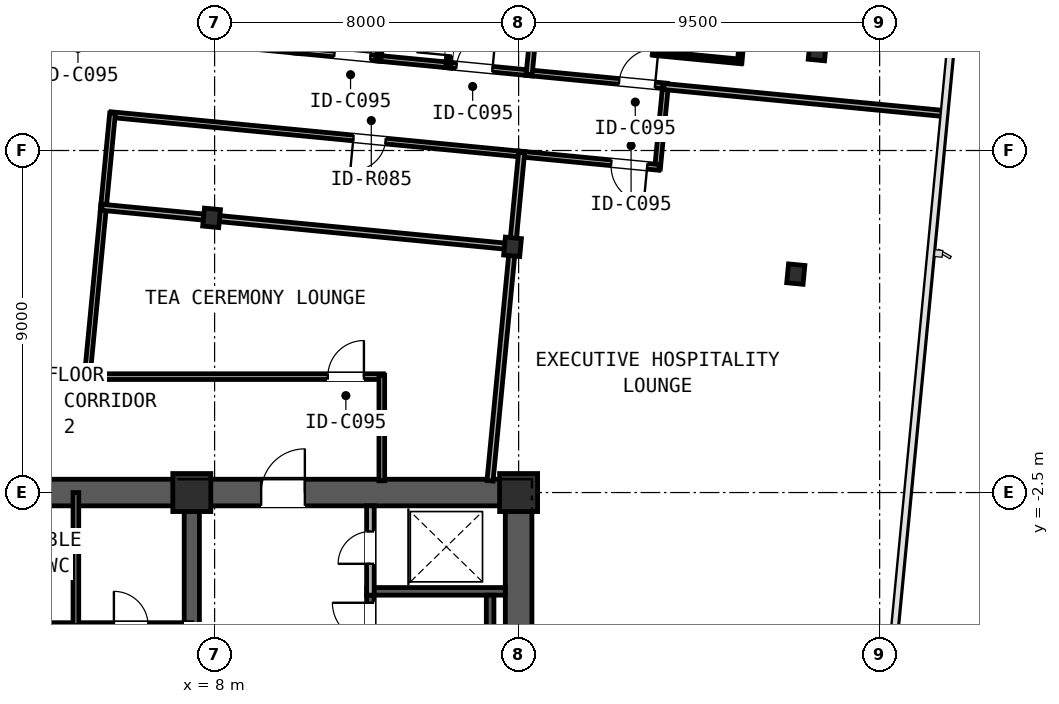
"""IFC4 building model, lengths in metres.
Left out: names, types, materials, properties, quantities, classifications, styles, units other than length and angle.
Written with IfcOpenShell. Run it as: python <this file> out.ifc"""

import sys

from ifc_helpers import new_model, si_unit, direction, frame, frame_2d, origin, origin_2d, place, context, subcontext, project, spatial, rectangle, i_section, extrude, element, fill, save


model = new_model("IFC4")
c1 = context("Model", 3, precision=1e-05, world=origin(), true_north=direction((0.0, 1.0)))
c2 = subcontext(c1, "Body", "Model", "MODEL_VIEW")
j1 = project(units=[si_unit("LENGTHUNIT", "METRE"), si_unit("PLANEANGLEUNIT", "RADIAN")], contexts=[c1])
p1 = place(None, origin())
s1 = spatial("IfcSite", under=j1, at=p1, CompositionType="ELEMENT")
p2 = place(p1, origin())
s2 = spatial("IfcBuilding", under=s1, at=p2, CompositionType="ELEMENT")
p3 = place(p2, frame((0.0, 0.0, 139.35)))
s3 = spatial("IfcBuildingStorey", under=s2, at=p3, CompositionType="ELEMENT", Elevation=139.35)
p4 = place(p3, frame((-16.35, -2.5, 0.0), z_axis=(0.0, 0.0, 1.0), x_axis=(1.0, 0.0, 0.0)))
e1 = element("IfcWall", 1, at=p4, inside=s3, PredefinedType="SHEAR", context=c2, shape_type="SweptSolid", body=[
    extrude(rectangle(XDim=32.7, YDim=0.7, at=frame_2d((16.35, 0.0))), origin(), (0.0, 0.0, 1.0), 2.91),
])
p5 = place(p4, frame((5.975, 0.0, 0.0)))
e2 = element("IfcOpeningElement", 2, at=p5, cuts=e1, PredefinedType="OPENING", context=c2, shape_type="SweptSolid", body=[
    extrude(rectangle(XDim=1.15, YDim=2.0, at=frame_2d((0.575, 1.0))), frame((0.0, 0.36, 0.0), z_axis=(0.0, -1.0, 0.0), x_axis=(1.0, 0.0, 0.0)), (0.0, 0.0, 1.0), 0.72),
])
p6 = place(p4, frame((15.55, 0.0, 0.0)))
e3 = element("IfcOpeningElement", 3, at=p6, cuts=e1, PredefinedType="OPENING", context=c2, shape_type="SweptSolid", body=[
    extrude(rectangle(XDim=1.6, YDim=2.0, at=frame_2d((0.8, 1.0))), frame((0.0, 0.36, 0.0), z_axis=(0.0, -1.0, 0.0), x_axis=(1.0, 0.0, 0.0)), (0.0, 0.0, 1.0), 0.72),
])
p7 = place(p4, frame((25.575, 0.0, 0.0)))
e4 = element("IfcOpeningElement", 4, at=p7, cuts=e1, PredefinedType="OPENING", context=c2, shape_type="SweptSolid", body=[
    extrude(rectangle(XDim=1.15, YDim=2.0, at=frame_2d((0.575, 1.0))), frame((0.0, 0.36, 0.0), z_axis=(0.0, -1.0, 0.0), x_axis=(1.0, 0.0, 0.0)), (0.0, 0.0, 1.0), 0.72),
])
p8 = place(p3, frame((16.0, -12.65, 0.0), z_axis=(0.0, 0.0, 1.0), x_axis=(0.0, 1.0, 0.0)))
e5 = element("IfcWall", 5, at=p8, inside=s3, PredefinedType="SHEAR", context=c2, shape_type="SweptSolid", body=[
    extrude(rectangle(XDim=9.8, YDim=0.7, at=frame_2d((4.9, 0.0))), origin(), (0.0, 0.0, 1.0), 2.91),
])
p9 = place(p3, frame((7.4, -12.65, 0.0), z_axis=(0.0, 0.0, 1.0), x_axis=(0.0, 1.0, 0.0)))
e6 = element("IfcWall", 6, at=p9, inside=s3, PredefinedType="SHEAR", context=c2, shape_type="SweptSolid", body=[
    extrude(rectangle(XDim=9.8, YDim=0.4, at=frame_2d((4.9, 0.0))), origin(), (0.0, 0.0, 1.0), 3.19),
])
p10 = place(p3, frame((12.0, -5.1, 0.0), z_axis=(0.0, 0.0, 1.0), x_axis=(1.0, 0.0, 0.0)))
e7 = element("IfcWall", 7, at=p10, inside=s3, PredefinedType="SOLIDWALL", context=c2, shape_type="SweptSolid", body=[
    extrude(rectangle(XDim=3.65, YDim=0.2, at=frame_2d((1.825, 0.0))), origin(), (0.0, 0.0, 1.0), 3.19),
])
p11 = place(p3, frame((12.1, -12.2, 0.0), z_axis=(0.0, 0.0, 1.0), x_axis=(0.0, 1.0, 0.0)))
e8 = element("IfcWall", 8, at=p11, inside=s3, PredefinedType="SOLIDWALL", context=c2, shape_type="SweptSolid", body=[
    extrude(rectangle(XDim=7.0, YDim=0.2, at=frame_2d((3.5, 0.0))), origin(), (0.0, 0.0, 1.0), 3.19),
])
p12 = place(p11, frame((5.8, 0.0, 0.0)))
e9 = element("IfcOpeningElement", 9, at=p12, cuts=e8, PredefinedType="OPENING", context=c2, shape_type="SweptSolid", body=[
    extrude(rectangle(XDim=1.0, YDim=2.1, at=frame_2d((0.5, 1.05))), frame((0.0, 0.11, 0.0), z_axis=(0.0, -1.0, 0.0), x_axis=(1.0, 0.0, 0.0)), (0.0, 0.0, 1.0), 0.22),
])
p13 = place(p3, frame((15.25, -12.2, 0.0), z_axis=(0.0, 0.0, 1.0), x_axis=(0.0, 1.0, 0.0)))
e10 = element("IfcWall", 10, at=p13, inside=s3, PredefinedType="SOLIDWALL", context=c2, shape_type="SweptSolid", body=[
    extrude(rectangle(XDim=7.0, YDim=0.2, at=frame_2d((3.5, 0.0))), origin(), (0.0, 0.0, 1.0), 3.19),
])
for number, where, z_axis, x_axis in (
    (11, (7.4, -2.5, 0.0), (0.0, 0.0, 1.0), (1.0, 0.0, 0.0)),
    (12, (16.0, -2.5, 0.0), (0.0, 0.0, 1.0), (1.0, 0.0, 0.0)),
):
    element("IfcColumn", number, at=place(p3, frame(where, z_axis=z_axis, x_axis=x_axis)), inside=s3, PredefinedType="COLUMN", context=c2, shape_type="SweptSolid", body=[
        extrude(rectangle(XDim=1.0, YDim=1.0, at=origin_2d()), origin(), (0.0, 0.0, 1.0), 3.45),
    ])
for number, where, z_axis, x_axis in (
    (13, (7.921, 4.728, 0.0), (0.0, 0.0, 1.0), (0.995, -0.096, 0.0)),
    (14, (15.84, 3.965, 0.0), (0.0, 0.0, 1.0), (0.995, -0.096, 0.0)),
):
    element("IfcColumn", number, at=place(p3, frame(where, z_axis=z_axis, x_axis=x_axis)), inside=s3, PredefinedType="COLUMN", context=c2, shape_type="SweptSolid", body=[
        extrude(i_section(OverallWidth=0.424, OverallDepth=0.474, WebThickness=0.048, FlangeThickness=0.077, FilletRadius=0.031, at=origin_2d()), origin(), (0.0, 0.0, 1.0), 3.45),
    ])
for number, where, z_axis, x_axis in (
    (15, (23.293, 3.248, 0.0), (0.0, 0.0, 1.0), (0.995, -0.096, 0.0)),
    (16, (23.86, 9.128, 0.0), (0.0, 0.0, 1.0), (0.995, -0.096, 0.0)),
):
    element("IfcColumn", number, at=place(p3, frame(where, z_axis=z_axis, x_axis=x_axis)), inside=s3, PredefinedType="COLUMN", context=c2, shape_type="SweptSolid", body=[
        extrude(i_section(OverallWidth=0.432, OverallDepth=0.498, WebThickness=0.056, FlangeThickness=0.089, FilletRadius=0.031, at=origin_2d()), origin(), (0.0, 0.0, 1.0), 3.45),
    ])
p14 = place(p3, frame((12.1, -5.2, 0.0), z_axis=(0.0, 0.0, 1.0), x_axis=(0.0, 1.0, 0.0)))
e17 = element("IfcWall", 17, at=p14, inside=s3, PredefinedType="PARTITIONING", context=c2, shape_type="SweptSolid", body=[
    extrude(rectangle(XDim=2.35, YDim=0.2, at=frame_2d((1.175, 0.0))), origin(), (0.0, 0.0, 1.0), 2.225),
])
p15 = place(p14, frame((0.825, 0.0, 0.0)))
e18 = element("IfcOpeningElement", 18, at=p15, cuts=e17, PredefinedType="OPENING", context=c2, shape_type="SweptSolid", body=[
    extrude(rectangle(XDim=0.85, YDim=2.05, at=frame_2d((0.425, 1.025))), frame((0.0, 0.11, 0.0), z_axis=(0.0, -1.0, 0.0), x_axis=(1.0, 0.0, 0.0)), (0.0, 0.0, 1.0), 0.22),
])
p16 = place(p3, frame((1.6, -6.0, 0.0), z_axis=(0.0, 0.0, 1.0), x_axis=(1.0, 0.0, 0.0)))
e19 = element("IfcWall", 19, at=p16, inside=s3, PredefinedType="PARTITIONING", context=c2, shape_type="SweptSolid", body=[
    extrude(rectangle(XDim=5.8, YDim=0.15, at=frame_2d((2.9, 0.0))), origin(), (0.0, 0.0, 1.0), 3.19),
])
p17 = place(p16, frame((0.9, 0.0, 0.0)))
e20 = element("IfcOpeningElement", 20, at=p17, cuts=e19, PredefinedType="OPENING", context=c2, shape_type="SweptSolid", body=[
    extrude(rectangle(XDim=0.9, YDim=2.1, at=frame_2d((0.45, 1.05))), frame((0.0, 0.085, 0.0), z_axis=(0.0, -1.0, 0.0), x_axis=(1.0, 0.0, 0.0)), (0.0, 0.0, 1.0), 0.17),
])
p18 = place(p16, frame((3.75, 0.0, 0.0)))
e21 = element("IfcOpeningElement", 21, at=p18, cuts=e19, PredefinedType="OPENING", context=c2, shape_type="SweptSolid", body=[
    extrude(rectangle(XDim=0.9, YDim=2.1, at=frame_2d((0.45, 1.05))), frame((0.0, 0.085, 0.0), z_axis=(0.0, -1.0, 0.0), x_axis=(1.0, 0.0, 0.0)), (0.0, 0.0, 1.0), 0.17),
])
p19 = place(p3, frame((4.35, -6.0, 0.0), z_axis=(0.0, 0.0, 1.0), x_axis=(0.0, 1.0, 0.0)))
e22 = element("IfcWall", 22, at=p19, inside=s3, PredefinedType="PARTITIONING", context=c2, shape_type="SweptSolid", body=[
    extrude(rectangle(XDim=3.5, YDim=0.15, at=frame_2d((1.75, 0.0))), origin(), (0.0, 0.0, 1.0), 2.225),
])
p20 = place(p3, frame((10.101, 9.139, 0.0), z_axis=(0.0, 0.0, 1.0), x_axis=(0.995393345625, -0.095875374756, 0.0)))
e23 = element("IfcWall", 23, at=p20, inside=s3, PredefinedType="PARTITIONING", context=c2, shape_type="SweptSolid", body=[
    extrude(rectangle(XDim=2.312, YDim=0.15, at=frame_2d((1.156, 0.0))), origin(), (0.0, 0.0, 1.0), 2.718),
])
p21 = place(p20, frame((1.056, 0.0, 0.0)))
e24 = element("IfcOpeningElement", 24, at=p21, cuts=e23, PredefinedType="OPENING", context=c2, shape_type="SweptSolid", body=[
    extrude(rectangle(XDim=0.95, YDim=2.15, at=frame_2d((0.475, 1.075))), frame((0.0, 0.085, 0.0), z_axis=(0.0, -1.0, 0.0), x_axis=(1.0, 0.0, 0.0)), (0.0, 0.0, 1.0), 0.17),
])
p22 = place(p3, frame((8.28, 9.314, 0.0), z_axis=(0.0, 0.0, 1.0), x_axis=(0.995393086543, -0.095878064554, 0.0)))
e25 = element("IfcWall", 25, at=p22, inside=s3, PredefinedType="PARTITIONING", context=c2, shape_type="SweptSolid", body=[
    extrude(rectangle(XDim=1.994, YDim=0.15, at=frame_2d((0.997, 0.0))), origin(), (0.0, 0.0, 1.0), 2.479),
])
p23 = place(p3, frame((14.061, 8.758, 0.0), z_axis=(0.0, 0.0, 1.0), x_axis=(0.995393345625, -0.095875374756, 0.0)))
e26 = element("IfcWall", 26, at=p23, inside=s3, PredefinedType="PARTITIONING", context=c2, shape_type="SweptSolid", body=[
    extrude(rectangle(XDim=2.312, YDim=0.15, at=frame_2d((1.156, 0.0))), origin(), (0.0, 0.0, 1.0), 2.479),
])
p24 = place(p23, frame((0.306, 0.0, 0.0)))
e27 = element("IfcOpeningElement", 27, at=p24, cuts=e26, PredefinedType="OPENING", context=c2, shape_type="SweptSolid", body=[
    extrude(rectangle(XDim=0.95, YDim=2.15, at=frame_2d((0.475, 1.075))), frame((0.0, 0.085, 0.0), z_axis=(0.0, -1.0, 0.0), x_axis=(1.0, 0.0, 0.0)), (0.0, 0.0, 1.0), 0.17),
])
p25 = place(p3, frame((12.24, 8.933, 0.0), z_axis=(0.0, 0.0, 1.0), x_axis=(0.995405888026, -0.095745068196, 0.0)))
e28 = element("IfcWall", 28, at=p25, inside=s3, PredefinedType="PARTITIONING", context=c2, shape_type="SweptSolid", body=[
    extrude(rectangle(XDim=1.994, YDim=0.15, at=frame_2d((0.997, 0.0))), origin(), (0.0, 0.0, 1.0), 2.718),
])
p26 = place(p3, frame((16.199, 8.552, 0.0), z_axis=(0.0, 0.0, 1.0), x_axis=(0.995391104887, -0.095898635608, 0.0)))
e29 = element("IfcWall", 29, at=p26, inside=s3, PredefinedType="PARTITIONING", context=c2, shape_type="SweptSolid", body=[
    extrude(rectangle(XDim=3.722, YDim=0.15, at=frame_2d((1.861, 0.0))), origin(), (0.0, 0.0, 1.0), 2.479),
])
p27 = place(p26, frame((2.457, 0.0, 0.0)))
e30 = element("IfcOpeningElement", 30, at=p27, cuts=e29, PredefinedType="OPENING", context=c2, shape_type="SweptSolid", body=[
    extrude(rectangle(XDim=0.95, YDim=2.15, at=frame_2d((0.475, 1.075))), frame((0.0, 0.085, 0.0), z_axis=(0.0, -1.0, 0.0), x_axis=(1.0, 0.0, 0.0)), (0.0, 0.0, 1.0), 0.17),
])
p28 = place(p3, frame((16.156, 6.396, 0.0), z_axis=(0.0, 0.0, 1.0), x_axis=(-0.99539478422, 0.095860437863, 0.0)))
e31 = element("IfcWall", 31, at=p28, inside=s3, PredefinedType="PARTITIONING", context=c2, shape_type="SweptSolid", body=[
    extrude(rectangle(XDim=10.936, YDim=0.15, at=frame_2d((5.468, 0.0))), origin(), (0.0, 0.0, 1.0), 2.479),
])
p29 = place(p28, frame((3.675, 0.0, 0.0)))
e32 = element("IfcOpeningElement", 32, at=p29, cuts=e31, PredefinedType="OPENING", context=c2, shape_type="SweptSolid", body=[
    extrude(rectangle(XDim=0.85, YDim=2.05, at=frame_2d((0.425, 1.025))), frame((0.0, 0.085, 0.0), z_axis=(0.0, -1.0, 0.0), x_axis=(1.0, 0.0, 0.0)), (0.0, 0.0, 1.0), 0.17),
])
p30 = place(p3, frame((5.314, 7.48, 0.0), z_axis=(0.0, 0.0, 1.0), x_axis=(-0.09587519517, -0.995393362923, 0.0)))
e33 = element("IfcWall", 33, at=p30, inside=s3, PredefinedType="PARTITIONING", context=c2, shape_type="SweptSolid", body=[
    extrude(rectangle(XDim=2.572, YDim=0.15, at=frame_2d((1.286, 0.0))), origin(), (0.0, 0.0, 1.0), 2.479),
])
p31 = place(p3, frame((5.084, 5.083, 0.0), z_axis=(0.0, 0.0, 1.0), x_axis=(-0.095867331855, -0.995394120277, 0.0)))
e34 = element("IfcWall", 34, at=p31, inside=s3, PredefinedType="PARTITIONING", context=c2, shape_type="SweptSolid", body=[
    extrude(rectangle(XDim=4.594, YDim=0.15, at=frame_2d((2.297, 0.0))), origin(), (0.0, 0.0, 1.0), 2.479),
])
p32 = place(p3, frame((4.607, 0.55, 0.0), z_axis=(0.0, 0.0, 1.0), x_axis=(1.0, 0.0, 0.0)))
e35 = element("IfcWall", 35, at=p32, inside=s3, PredefinedType="PARTITIONING", context=c2, shape_type="SweptSolid", body=[
    extrude(rectangle(XDim=7.833, YDim=0.15, at=frame_2d((3.917, 0.0))), origin(), (0.0, 0.0, 1.0), 2.479),
])
p33 = place(p32, frame((6.372, 0.0, 0.0)))
e36 = element("IfcOpeningElement", 36, at=p33, cuts=e35, PredefinedType="OPENING", context=c2, shape_type="SweptSolid", body=[
    extrude(rectangle(XDim=0.95, YDim=2.15, at=frame_2d((0.475, 1.075))), frame((0.0, 0.085, 0.0), z_axis=(0.0, -1.0, 0.0), x_axis=(1.0, 0.0, 0.0)), (0.0, 0.0, 1.0), 0.17),
])
p34 = place(p3, frame((12.4, 0.59, 0.0), z_axis=(0.0, 0.0, 1.0), x_axis=(0.0, -1.0, 0.0)))
e37 = element("IfcWall", 37, at=p34, inside=s3, PredefinedType="PARTITIONING", context=c2, shape_type="SweptSolid", body=[
    extrude(rectangle(XDim=2.78, YDim=0.15, at=frame_2d((1.39, 0.0))), origin(), (0.0, 0.0, 1.0), 2.225),
])
p35 = place(p3, frame((19.866, 8.219, 0.0), z_axis=(0.0, 0.0, 1.0), x_axis=(-0.095773447772, -0.995403157872, 0.0)))
e38 = element("IfcWall", 38, at=p35, inside=s3, PredefinedType="PARTITIONING", context=c2, shape_type="SweptSolid", body=[
    extrude(rectangle(XDim=2.21, YDim=0.15, at=frame_2d((1.105, 0.0))), origin(), (0.0, 0.0, 1.0), 2.718),
])
p36 = place(p3, frame((19.698, 6.055, 0.0), z_axis=(0.0, 0.0, 1.0), x_axis=(-0.995397364202, 0.095833644092, 0.0)))
e39 = element("IfcWall", 39, at=p36, inside=s3, PredefinedType="PARTITIONING", context=c2, shape_type="SweptSolid", body=[
    extrude(rectangle(XDim=3.722, YDim=0.15, at=frame_2d((1.861, 0.0))), origin(), (0.0, 0.0, 1.0), 2.479),
])
p37 = place(p36, frame((0.315, 0.0, 0.0)))
e40 = element("IfcOpeningElement", 40, at=p37, cuts=e39, PredefinedType="OPENING", context=c2, shape_type="SweptSolid", body=[
    extrude(rectangle(XDim=0.95, YDim=2.15, at=frame_2d((0.475, 1.075))), frame((0.0, 0.085, 0.0), z_axis=(0.0, -1.0, 0.0), x_axis=(1.0, 0.0, 0.0)), (0.0, 0.0, 1.0), 0.17),
])
p38 = place(p3, frame((10.179, 9.091, 0.0), z_axis=(0.0, 0.0, 1.0), x_axis=(0.095799078022, 0.995400691506, 0.0)))
e41 = element("IfcWall", 41, at=p38, inside=s3, PredefinedType="PARTITIONING", context=c2, shape_type="SweptSolid", body=[
    extrude(rectangle(XDim=2.63, YDim=0.12, at=frame_2d((1.315, 0.0))), origin(), (0.0, 0.0, 1.0), 2.479),
])
p39 = place(p38, frame((0.247, 0.0, 0.0)))
e42 = element("IfcOpeningElement", 42, at=p39, cuts=e41, PredefinedType="OPENING", context=c2, shape_type="SweptSolid", body=[
    extrude(rectangle(XDim=0.85, YDim=2.1, at=frame_2d((0.425, 1.05))), frame((0.0, 0.07, 0.0), z_axis=(0.0, -1.0, 0.0), x_axis=(1.0, 0.0, 0.0)), (0.0, 0.0, 1.0), 0.14),
])
p40 = place(p3, frame((12.526, 11.048, 0.0), z_axis=(0.0, 0.0, 1.0), x_axis=(-0.095875173929, -0.995393364969, 0.0)))
e43 = element("IfcWall", 43, at=p40, inside=s3, PredefinedType="PARTITIONING", context=c2, shape_type="SweptSolid", body=[
    extrude(rectangle(XDim=2.172, YDim=0.12, at=frame_2d((1.086, 0.0))), origin(), (0.0, 0.0, 1.0), 2.479),
])
p41 = place(p3, frame((14.139, 8.71, 0.0), z_axis=(0.0, 0.0, 1.0), x_axis=(0.095825980341, 0.995398102013, 0.0)))
e44 = element("IfcWall", 44, at=p41, inside=s3, PredefinedType="PARTITIONING", context=c2, shape_type="SweptSolid", body=[
    extrude(rectangle(XDim=2.13, YDim=0.12, at=frame_2d((1.065, 0.0))), origin(), (0.0, 0.0, 1.0), 2.479),
])
p42 = place(p41, frame((0.296, 0.0, 0.0)))
e45 = element("IfcOpeningElement", 45, at=p42, cuts=e44, PredefinedType="OPENING", context=c2, shape_type="SweptSolid", body=[
    extrude(rectangle(XDim=0.85, YDim=2.1, at=frame_2d((0.425, 1.05))), frame((0.0, 0.07, 0.0), z_axis=(0.0, -1.0, 0.0), x_axis=(1.0, 0.0, 0.0)), (0.0, 0.0, 1.0), 0.14),
])
p43 = place(p3, frame((16.389, 9.671, 0.0), z_axis=(0.0, 0.0, 1.0), x_axis=(-0.095811626391, -0.995399483749, 0.0)))
e46 = element("IfcWall", 46, at=p43, inside=s3, PredefinedType="PARTITIONING", context=c2, shape_type="SweptSolid", body=[
    extrude(rectangle(XDim=1.172, YDim=0.16, at=frame_2d((0.586, 0.0))), origin(), (0.0, 0.0, 1.0), 2.479),
])
p44 = place(p3, frame((19.798, 11.217, 0.0), z_axis=(0.0, 0.0, 1.0), x_axis=(-0.100620321887, -0.994924897077, 0.0)))
e47 = element("IfcWall", 47, at=p44, inside=s3, PredefinedType="PARTITIONING", context=c2, shape_type="SweptSolid", body=[
    extrude(rectangle(XDim=2.208, YDim=0.12, at=frame_2d((1.104, 0.0))), origin(), (0.0, 0.0, 1.0), 2.479),
])
p45 = place(p3, frame((19.54, 9.064, 0.0), z_axis=(0.0, 0.0, 1.0), x_axis=(0.995393658532, -0.095872126059, 0.0)))
e48 = element("IfcWall", 48, at=p45, inside=s3, PredefinedType="PARTITIONING", context=c2, shape_type="SweptSolid", body=[
    extrude(rectangle(XDim=2.33, YDim=0.12, at=frame_2d((1.165, 0.0))), origin(), (0.0, 0.0, 1.0), 2.718),
])
p46 = place(p3, frame((21.816, 8.805, 0.0), z_axis=(0.0, 0.0, 1.0), x_axis=(0.09110395288, 0.995841387857, 0.0)))
e49 = element("IfcWall", 49, at=p46, inside=s3, PredefinedType="PARTITIONING", context=c2, shape_type="SweptSolid", body=[
    extrude(rectangle(XDim=2.208, YDim=0.12, at=frame_2d((1.104, 0.0))), origin(), (0.0, 0.0, 1.0), 2.479),
])
p47 = place(p3, frame((27.236, 7.469, 0.0), z_axis=(0.0, 0.0, 1.0), x_axis=(-0.995396228159, 0.095845443117, 0.0)))
e50 = element("IfcWall", 50, at=p47, inside=s3, PredefinedType="PARTITIONING", context=c2, shape_type="SweptSolid", body=[
    extrude(rectangle(XDim=7.448, YDim=0.16, at=frame_2d((3.724, 0.0))), origin(), (0.0, 0.0, 1.0), 2.557),
])
p48 = place(p3, frame((7.745, 4.745, 0.0), z_axis=(0.0, 0.0, 1.0), x_axis=(-0.995392910691, 0.095879890208, 0.0)))
e51 = element("IfcWall", 51, at=p48, inside=s3, PredefinedType="PARTITIONING", context=c2, shape_type="SweptSolid", body=[
    extrude(rectangle(XDim=2.722, YDim=0.16, at=frame_2d((1.361, 0.0))), origin(), (0.0, 0.0, 1.0), 2.479),
])
p49 = place(p3, frame((15.665, 3.982, 0.0), z_axis=(0.0, 0.0, 1.0), x_axis=(-0.995396667246, 0.095840882902, 0.0)))
e52 = element("IfcWall", 52, at=p49, inside=s3, PredefinedType="PARTITIONING", context=c2, shape_type="SweptSolid", body=[
    extrude(rectangle(XDim=7.604, YDim=0.16, at=frame_2d((3.802, 0.0))), origin(), (0.0, 0.0, 1.0), 2.479),
])
p50 = place(p3, frame((16.079, 6.444, 0.0), z_axis=(0.0, 0.0, 1.0), x_axis=(-0.095794827695, -0.995401100555, 0.0)))
e53 = element("IfcWall", 53, at=p50, inside=s3, PredefinedType="PARTITIONING", context=c2, shape_type="SweptSolid", body=[
    extrude(rectangle(XDim=2.314, YDim=0.16, at=frame_2d((1.157, 0.0))), origin(), (0.0, 0.0, 1.0), 2.479),
])
p51 = place(p3, frame((15.823, 3.79, 0.0), z_axis=(0.0, 0.0, 1.0), x_axis=(-0.095865726078, -0.99539427493, 0.0)))
e54 = element("IfcWall", 54, at=p51, inside=s3, PredefinedType="PARTITIONING", context=c2, shape_type="SweptSolid", body=[
    extrude(rectangle(XDim=6.008, YDim=0.16, at=frame_2d((3.004, 0.0))), origin(), (0.0, 0.0, 1.0), 2.225),
])
p52 = place(p12, origin())
e55 = element("IfcDoor", 55, at=p52, inside=s3, OperationType="SINGLE_SWING_RIGHT", PredefinedType="DOOR", context=c2, shape_type="SweptSolid", body=[
    extrude(rectangle(XDim=1.0, YDim=2.1, at=frame_2d((0.5, 1.05))), frame((0.0, 0.025, 0.0), z_axis=(0.0, -1.0, 0.0), x_axis=(1.0, 0.0, 0.0)), (0.0, 0.0, 1.0), 0.05),
])
fill(e9, e55)
p53 = place(p15, frame((0.85, 0.0, 0.0), z_axis=(0.0, 0.0, 1.0), x_axis=(-1.0, 0.0, 0.0)))
e56 = element("IfcDoor", 56, at=p53, inside=s3, OperationType="SINGLE_SWING_LEFT", PredefinedType="DOOR", context=c2, shape_type="SweptSolid", body=[
    extrude(rectangle(XDim=0.85, YDim=2.05, at=frame_2d((0.425, 1.025))), frame((0.0, 0.025, 0.0), z_axis=(0.0, -1.0, 0.0), x_axis=(1.0, 0.0, 0.0)), (0.0, 0.0, 1.0), 0.05),
])
fill(e18, e56)
p54 = place(p7, origin())
e57 = element("IfcDoor", 57, at=p54, inside=s3, OperationType="SINGLE_SWING_RIGHT", PredefinedType="DOOR", context=c2, shape_type="SweptSolid", body=[
    extrude(rectangle(XDim=1.15, YDim=2.0, at=frame_2d((0.575, 1.0))), frame((0.0, 0.025, 0.0), z_axis=(0.0, -1.0, 0.0), x_axis=(1.0, 0.0, 0.0)), (0.0, 0.0, 1.0), 0.05),
])
fill(e4, e57)
p55 = place(p21, frame((0.95, 0.0, 0.0), z_axis=(0.0, 0.0, 1.0), x_axis=(-1.0, 0.0, 0.0)))
e58 = element("IfcDoor", 58, at=p55, inside=s3, OperationType="SINGLE_SWING_RIGHT", PredefinedType="DOOR", context=c2, shape_type="SweptSolid", body=[
    extrude(rectangle(XDim=0.95, YDim=2.15, at=frame_2d((0.475, 1.075))), frame((0.0, 0.025, 0.0), z_axis=(0.0, -1.0, 0.0), x_axis=(1.0, 0.0, 0.0)), (0.0, 0.0, 1.0), 0.05),
])
fill(e24, e58)
p56 = place(p24, frame((0.95, 0.0, 0.0), z_axis=(0.0, 0.0, 1.0), x_axis=(-1.0, 0.0, 0.0)))
e59 = element("IfcDoor", 59, at=p56, inside=s3, OperationType="SINGLE_SWING_RIGHT", PredefinedType="DOOR", context=c2, shape_type="SweptSolid", body=[
    extrude(rectangle(XDim=0.95, YDim=2.15, at=frame_2d((0.475, 1.075))), frame((0.0, 0.025, 0.0), z_axis=(0.0, -1.0, 0.0), x_axis=(1.0, 0.0, 0.0)), (0.0, 0.0, 1.0), 0.05),
])
fill(e27, e59)
p57 = place(p42, origin())
e60 = element("IfcDoor", 60, at=p57, inside=s3, OperationType="SINGLE_SWING_LEFT", PredefinedType="DOOR", context=c2, shape_type="SweptSolid", body=[
    extrude(rectangle(XDim=0.85, YDim=2.1, at=frame_2d((0.425, 1.05))), frame((0.0, 0.025, 0.0), z_axis=(0.0, -1.0, 0.0), x_axis=(1.0, 0.0, 0.0)), (0.0, 0.0, 1.0), 0.05),
])
fill(e45, e60)
p58 = place(p27, frame((0.95, 0.0, 0.0), z_axis=(0.0, 0.0, 1.0), x_axis=(-1.0, 0.0, 0.0)))
e61 = element("IfcDoor", 61, at=p58, inside=s3, OperationType="SINGLE_SWING_RIGHT", PredefinedType="DOOR", context=c2, shape_type="SweptSolid", body=[
    extrude(rectangle(XDim=0.95, YDim=2.15, at=frame_2d((0.475, 1.075))), frame((0.0, 0.025, 0.0), z_axis=(0.0, -1.0, 0.0), x_axis=(1.0, 0.0, 0.0)), (0.0, 0.0, 1.0), 0.05),
])
fill(e30, e61)
p59 = place(p29, frame((0.85, 0.0, 0.0), z_axis=(0.0, 0.0, 1.0), x_axis=(-1.0, 0.0, 0.0)))
e62 = element("IfcDoor", 62, at=p59, inside=s3, OperationType="SINGLE_SWING_RIGHT", PredefinedType="DOOR", context=c2, shape_type="SweptSolid", body=[
    extrude(rectangle(XDim=0.85, YDim=2.05, at=frame_2d((0.425, 1.025))), frame((0.0, 0.025, 0.0), z_axis=(0.0, -1.0, 0.0), x_axis=(1.0, 0.0, 0.0)), (0.0, 0.0, 1.0), 0.05),
])
fill(e32, e62)
p60 = place(p33, origin())
e63 = element("IfcDoor", 63, at=p60, inside=s3, OperationType="SINGLE_SWING_RIGHT", PredefinedType="DOOR", context=c2, shape_type="SweptSolid", body=[
    extrude(rectangle(XDim=0.95, YDim=2.15, at=frame_2d((0.475, 1.075))), frame((0.0, 0.025, 0.0), z_axis=(0.0, -1.0, 0.0), x_axis=(1.0, 0.0, 0.0)), (0.0, 0.0, 1.0), 0.05),
])
fill(e36, e63)
p61 = place(p37, frame((0.95, 0.0, 0.0), z_axis=(0.0, 0.0, 1.0), x_axis=(-1.0, 0.0, 0.0)))
e64 = element("IfcDoor", 64, at=p61, inside=s3, OperationType="SINGLE_SWING_LEFT", PredefinedType="DOOR", context=c2, shape_type="SweptSolid", body=[
    extrude(rectangle(XDim=0.95, YDim=2.15, at=frame_2d((0.475, 1.075))), frame((0.0, 0.025, 0.0), z_axis=(0.0, -1.0, 0.0), x_axis=(1.0, 0.0, 0.0)), (0.0, 0.0, 1.0), 0.05),
])
fill(e40, e64)
save(model, sys.argv[1])
